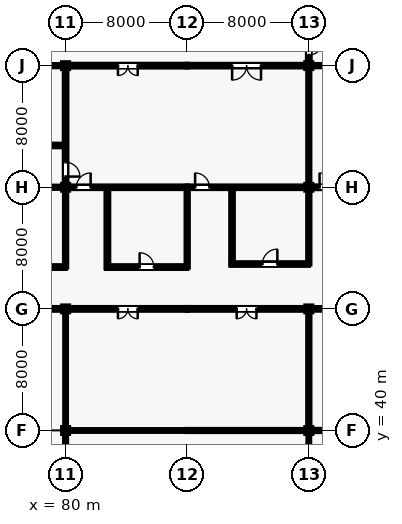
"""IFC4 building model, lengths in metres.
Left out: names, types, materials, properties, quantities, classifications, styles, units other than length and angle.
Written with IfcOpenShell. Run it as: python <this file> out.ifc"""

import sys

from ifc_helpers import new_model, si_unit, direction, frame, frame_2d, origin, origin_2d, place, context, subcontext, project, spatial, rectangle, i_section, extrude, element, fill, save


model = new_model("IFC4")
c1 = context("Model", 3, precision=1e-05, world=origin(), true_north=direction((0.0, 1.0)))
c2 = subcontext(c1, "Body", "Model", "MODEL_VIEW")
j1 = project(units=[si_unit("LENGTHUNIT", "METRE"), si_unit("PLANEANGLEUNIT", "RADIAN")], contexts=[c1])
p1 = place(None, origin())
s1 = spatial("IfcSite", under=j1, at=p1, CompositionType="ELEMENT")
p2 = place(p1, origin())
s2 = spatial("IfcBuilding", under=s1, at=p2, CompositionType="ELEMENT")
p3 = place(p2, origin())
s3 = spatial("IfcBuildingStorey", under=s2, at=p3, CompositionType="ELEMENT", Elevation=0.0)
for number, where, z_axis, x_axis in (
    (1, (80.0, 40.0, 0.0), (0.0, 0.0, 1.0), (1.0, 0.0, 0.0)),
    (2, (80.0, 48.0, 0.0), (0.0, 0.0, 1.0), (1.0, 0.0, 0.0)),
    (3, (80.0, 56.0, 0.0), (0.0, 0.0, 1.0), (1.0, 0.0, 0.0)),
    (4, (80.0, 64.0, 0.0), (0.0, 0.0, 1.0), (1.0, 0.0, 0.0)),
    (5, (96.0, 40.0, 0.0), (0.0, 0.0, 1.0), (1.0, 0.0, 0.0)),
    (6, (96.0, 48.0, 0.0), (0.0, 0.0, 1.0), (1.0, 0.0, 0.0)),
    (7, (96.0, 56.0, 0.0), (0.0, 0.0, 1.0), (1.0, 0.0, 0.0)),
    (8, (96.0, 64.0, 0.0), (0.0, 0.0, 1.0), (1.0, 0.0, 0.0)),
):
    element("IfcColumn", number, at=place(p3, frame(where, z_axis=z_axis, x_axis=x_axis)), inside=s3, PredefinedType="COLUMN", context=c2, shape_type="SweptSolid", body=[
        extrude(i_section(OverallWidth=0.398, OverallDepth=0.387, WebThickness=0.021, FlangeThickness=0.033, FilletRadius=0.015, at=origin_2d()), origin(), (0.0, 0.0, 1.0), 5.28),
    ])
p4 = place(p3, frame((74.7, 50.75, 0.0), z_axis=(0.0, 0.0, 1.0), x_axis=(1.0, 0.0, 0.0)))
e9 = element("IfcWall", 9, at=p4, inside=s3, PredefinedType="PARTITIONING", context=c2, shape_type="SweptSolid", body=[
    extrude(rectangle(XDim=5.28, YDim=0.185, at=frame_2d((2.64, 0.0))), origin(), (0.0, 0.0, 1.0), 4.403),
])
p5 = place(p4, frame((2.12, 0.0, 0.0)))
e10 = element("IfcOpeningElement", 10, at=p5, cuts=e9, PredefinedType="OPENING", context=c2, shape_type="SweptSolid", body=[
    extrude(rectangle(XDim=1.04, YDim=2.18, at=frame_2d((0.52, 1.09))), frame((0.0, 0.103, 0.0), z_axis=(0.0, -1.0, 0.0), x_axis=(1.0, 0.0, 0.0)), (0.0, 0.0, 1.0), 0.205),
])
p6 = place(p3, frame((74.75, 56.0, 0.0), z_axis=(0.0, 0.0, 1.0), x_axis=(1.0, 0.0, 0.0)))
e11 = element("IfcWall", 11, at=p6, inside=s3, PredefinedType="PARTITIONING", context=c2, shape_type="SweptSolid", body=[
    extrude(rectangle(XDim=5.041, YDim=0.15, at=frame_2d((2.521, 0.0))), origin(), (0.0, 0.0, 1.0), 4.327),
])
p7 = place(p3, frame((80.0, 50.75, 0.0), z_axis=(0.0, 0.0, 1.0), x_axis=(0.0, 1.0, 0.0)))
e12 = element("IfcWall", 12, at=p7, inside=s3, PredefinedType="PARTITIONING", context=c2, shape_type="SweptSolid", body=[
    extrude(rectangle(XDim=5.046, YDim=0.15, at=frame_2d((2.523, 0.0))), origin(), (0.0, 0.0, 1.0), 4.403),
])
p8 = place(p3, frame((74.7, 58.75, 0.0), z_axis=(0.0, 0.0, 1.0), x_axis=(1.0, 0.0, 0.0)))
e13 = element("IfcWall", 13, at=p8, inside=s3, PredefinedType="PARTITIONING", context=c2, shape_type="SweptSolid", body=[
    extrude(rectangle(XDim=5.28, YDim=0.175, at=frame_2d((2.64, 0.0))), origin(), (0.0, 0.0, 1.0), 4.412),
])
p9 = place(p8, frame((2.16, 0.0, 0.0)))
e14 = element("IfcOpeningElement", 14, at=p9, cuts=e13, PredefinedType="OPENING", context=c2, shape_type="SweptSolid", body=[
    extrude(rectangle(XDim=0.96, YDim=2.14, at=frame_2d((0.48, 1.07))), frame((0.0, 0.097, 0.0), z_axis=(0.0, -1.0, 0.0), x_axis=(1.0, 0.0, 0.0)), (0.0, 0.0, 1.0), 0.195),
])
p10 = place(p3, frame((74.75, 64.0, 0.0), z_axis=(0.0, 0.0, 1.0), x_axis=(1.0, 0.0, 0.0)))
e15 = element("IfcWall", 15, at=p10, inside=s3, PredefinedType="PARTITIONING", context=c2, shape_type="SweptSolid", body=[
    extrude(rectangle(XDim=5.041, YDim=0.15, at=frame_2d((2.521, 0.0))), origin(), (0.0, 0.0, 1.0), 4.403),
])
p11 = place(p3, frame((82.7, 50.75, 0.0), z_axis=(0.0, 0.0, 1.0), x_axis=(1.0, 0.0, 0.0)))
e16 = element("IfcWall", 16, at=p11, inside=s3, PredefinedType="PARTITIONING", context=c2, shape_type="SweptSolid", body=[
    extrude(rectangle(XDim=5.28, YDim=0.185, at=frame_2d((2.64, 0.0))), origin(), (0.0, 0.0, 1.0), 5.025),
])
p12 = place(p11, frame((2.17, 0.0, 0.0)))
e17 = element("IfcOpeningElement", 17, at=p12, cuts=e16, PredefinedType="OPENING", context=c2, shape_type="SweptSolid", body=[
    extrude(rectangle(XDim=0.94, YDim=2.12, at=frame_2d((0.47, 1.06))), frame((0.0, 0.103, 0.0), z_axis=(0.0, -1.0, 0.0), x_axis=(1.0, 0.0, 0.0)), (0.0, 0.0, 1.0), 0.205),
])
p13 = place(p3, frame((82.75, 50.7, 0.0), z_axis=(0.0, 0.0, 1.0), x_axis=(0.0, 1.0, 0.0)))
e18 = element("IfcWall", 18, at=p13, inside=s3, PredefinedType="PARTITIONING", context=c2, shape_type="SweptSolid", body=[
    extrude(rectangle(XDim=5.28, YDim=0.185, at=frame_2d((2.64, 0.0))), origin(), (0.0, 0.0, 1.0), 4.169),
])
p14 = place(p3, frame((88.0, 50.75, 0.0), z_axis=(0.0, 0.0, 1.0), x_axis=(0.0, 1.0, 0.0)))
e19 = element("IfcWall", 19, at=p14, inside=s3, PredefinedType="PARTITIONING", context=c2, shape_type="SweptSolid", body=[
    extrude(rectangle(XDim=5.23, YDim=0.15, at=frame_2d((2.615, 0.0))), origin(), (0.0, 0.0, 1.0), 4.169),
])
p15 = place(p3, frame((90.9, 50.95, 0.0), z_axis=(0.0, 0.0, 1.0), x_axis=(1.0, 0.0, 0.0)))
e20 = element("IfcWall", 20, at=p15, inside=s3, PredefinedType="PARTITIONING", context=c2, shape_type="SweptSolid", body=[
    extrude(rectangle(XDim=5.08, YDim=0.175, at=frame_2d((2.54, 0.0))), origin(), (0.0, 0.0, 1.0), 4.404),
])
p16 = place(p15, frame((2.05, 0.0, 0.0)))
e21 = element("IfcOpeningElement", 21, at=p16, cuts=e20, PredefinedType="OPENING", context=c2, shape_type="SweptSolid", body=[
    extrude(rectangle(XDim=0.98, YDim=2.15, at=frame_2d((0.49, 1.075))), frame((0.0, 0.097, 0.0), z_axis=(0.0, -1.0, 0.0), x_axis=(1.0, 0.0, 0.0)), (0.0, 0.0, 1.0), 0.195),
])
p17 = place(p3, frame((90.95, 50.9, 0.0), z_axis=(0.0, 0.0, 1.0), x_axis=(0.0, 1.0, 0.0)))
e22 = element("IfcWall", 22, at=p17, inside=s3, PredefinedType="PARTITIONING", context=c2, shape_type="SweptSolid", body=[
    extrude(rectangle(XDim=5.08, YDim=0.175, at=frame_2d((2.54, 0.0))), origin(), (0.0, 0.0, 1.0), 4.169),
])
p18 = place(p3, frame((96.0, 50.95, 0.0), z_axis=(0.0, 0.0, 1.0), x_axis=(0.0, 1.0, 0.0)))
e23 = element("IfcWall", 23, at=p18, inside=s3, PredefinedType="PARTITIONING", context=c2, shape_type="SweptSolid", body=[
    extrude(rectangle(XDim=4.846, YDim=0.15, at=frame_2d((2.423, 0.0))), origin(), (0.0, 0.0, 1.0), 4.404),
])
p19 = place(p3, frame((80.0, 32.184, 0.0), z_axis=(0.0, 0.0, 1.0), x_axis=(0.0, 1.0, 0.0)))
e24 = element("IfcWall", 24, at=p19, inside=s3, PredefinedType="PARTITIONING", context=c2, shape_type="SweptSolid", body=[
    extrude(rectangle(XDim=7.633, YDim=0.135, at=frame_2d((3.816, 0.0))), origin(), (0.0, 0.0, 1.0), 4.607),
])
p20 = place(p3, frame((80.0, 40.184, 0.0), z_axis=(0.0, 0.0, 1.0), x_axis=(0.0, 1.0, 0.0)))
e25 = element("IfcWall", 25, at=p20, inside=s3, PredefinedType="PARTITIONING", context=c2, shape_type="SweptSolid", body=[
    extrude(rectangle(XDim=7.633, YDim=0.12, at=frame_2d((3.816, 0.0))), origin(), (0.0, 0.0, 1.0), 4.471),
])
p21 = place(p3, frame((72.415, 48.0, 0.0), z_axis=(0.0, 0.0, 1.0), x_axis=(1.0, 0.0, 0.0)))
e26 = element("IfcWall", 26, at=p21, inside=s3, PredefinedType="PARTITIONING", context=c2, shape_type="SweptSolid", body=[
    extrude(rectangle(XDim=7.396, YDim=0.185, at=frame_2d((3.698, 0.0))), origin(), (0.0, 0.0, 1.0), 4.404),
])
p22 = place(p21, frame((3.048, 0.0, 0.0)))
e27 = element("IfcOpeningElement", 27, at=p22, cuts=e26, PredefinedType="OPENING", context=c2, shape_type="SweptSolid", body=[
    extrude(rectangle(XDim=1.3, YDim=2.2, at=frame_2d((0.65, 1.1))), frame((0.0, 0.103, 0.0), z_axis=(0.0, -1.0, 0.0), x_axis=(1.0, 0.0, 0.0)), (0.0, 0.0, 1.0), 0.205),
])
p23 = place(p3, frame((80.0, 56.184, 0.0), z_axis=(0.0, 0.0, 1.0), x_axis=(0.0, 1.0, 0.0)))
e28 = element("IfcWall", 28, at=p23, inside=s3, PredefinedType="PARTITIONING", context=c2, shape_type="SweptSolid", body=[
    extrude(rectangle(XDim=7.633, YDim=0.175, at=frame_2d((3.816, 0.0))), origin(), (0.0, 0.0, 1.0), 4.412),
])
p24 = place(p23, frame((0.52, 0.0, 0.0)))
e29 = element("IfcOpeningElement", 29, at=p24, cuts=e28, PredefinedType="OPENING", context=c2, shape_type="SweptSolid", body=[
    extrude(rectangle(XDim=0.94, YDim=2.12, at=frame_2d((0.47, 1.06))), frame((0.0, 0.097, 0.0), z_axis=(0.0, -1.0, 0.0), x_axis=(1.0, 0.0, 0.0)), (0.0, 0.0, 1.0), 0.195),
])
p25 = place(p3, frame((80.189, 40.0, 0.0), z_axis=(0.0, 0.0, 1.0), x_axis=(1.0, 0.0, 0.0)))
e30 = element("IfcWall", 30, at=p25, inside=s3, PredefinedType="PARTITIONING", context=c2, shape_type="SweptSolid", body=[
    extrude(rectangle(XDim=7.811, YDim=0.12, at=frame_2d((3.906, 0.0))), origin(), (0.0, 0.0, 1.0), 4.262),
])
p26 = place(p3, frame((80.189, 48.0, 0.0), z_axis=(0.0, 0.0, 1.0), x_axis=(1.0, 0.0, 0.0)))
e31 = element("IfcWall", 31, at=p26, inside=s3, PredefinedType="PARTITIONING", context=c2, shape_type="SweptSolid", body=[
    extrude(rectangle(XDim=7.811, YDim=0.185, at=frame_2d((3.906, 0.0))), origin(), (0.0, 0.0, 1.0), 4.097),
])
p27 = place(p26, frame((3.256, 0.0, 0.0)))
e32 = element("IfcOpeningElement", 32, at=p27, cuts=e31, PredefinedType="OPENING", context=c2, shape_type="SweptSolid", body=[
    extrude(rectangle(XDim=1.3, YDim=2.2, at=frame_2d((0.65, 1.1))), frame((0.0, 0.103, 0.0), z_axis=(0.0, -1.0, 0.0), x_axis=(1.0, 0.0, 0.0)), (0.0, 0.0, 1.0), 0.205),
])
p28 = place(p3, frame((80.189, 56.0, 0.0), z_axis=(0.0, 0.0, 1.0), x_axis=(1.0, 0.0, 0.0)))
e33 = element("IfcWall", 33, at=p28, inside=s3, PredefinedType="PARTITIONING", context=c2, shape_type="SweptSolid", body=[
    extrude(rectangle(XDim=7.811, YDim=0.175, at=frame_2d((3.906, 0.0))), origin(), (0.0, 0.0, 1.0), 4.169),
])
p29 = place(p28, frame((0.52, 0.0, 0.0)))
e34 = element("IfcOpeningElement", 34, at=p29, cuts=e33, PredefinedType="OPENING", context=c2, shape_type="SweptSolid", body=[
    extrude(rectangle(XDim=0.94, YDim=2.12, at=frame_2d((0.47, 1.06))), frame((0.0, 0.097, 0.0), z_axis=(0.0, -1.0, 0.0), x_axis=(1.0, 0.0, 0.0)), (0.0, 0.0, 1.0), 0.195),
])
p30 = place(p3, frame((80.189, 64.0, 0.0), z_axis=(0.0, 0.0, 1.0), x_axis=(1.0, 0.0, 0.0)))
e35 = element("IfcWall", 35, at=p30, inside=s3, PredefinedType="PARTITIONING", context=c2, shape_type="SweptSolid", body=[
    extrude(rectangle(XDim=7.811, YDim=0.185, at=frame_2d((3.906, 0.0))), origin(), (0.0, 0.0, 1.0), 4.25),
])
p31 = place(p30, frame((3.256, 0.0, 0.0)))
e36 = element("IfcOpeningElement", 36, at=p31, cuts=e35, PredefinedType="OPENING", context=c2, shape_type="SweptSolid", body=[
    extrude(rectangle(XDim=1.3, YDim=2.2, at=frame_2d((0.65, 1.1))), frame((0.0, 0.103, 0.0), z_axis=(0.0, -1.0, 0.0), x_axis=(1.0, 0.0, 0.0)), (0.0, 0.0, 1.0), 0.205),
])
p32 = place(p3, frame((96.0, 32.184, 0.0), z_axis=(0.0, 0.0, 1.0), x_axis=(0.0, 1.0, 0.0)))
e37 = element("IfcWall", 37, at=p32, inside=s3, PredefinedType="PARTITIONING", context=c2, shape_type="SweptSolid", body=[
    extrude(rectangle(XDim=7.633, YDim=0.12, at=frame_2d((3.816, 0.0))), origin(), (0.0, 0.0, 1.0), 4.603),
])
p33 = place(p3, frame((88.0, 40.0, 0.0), z_axis=(0.0, 0.0, 1.0), x_axis=(1.0, 0.0, 0.0)))
e38 = element("IfcWall", 38, at=p33, inside=s3, PredefinedType="PARTITIONING", context=c2, shape_type="SweptSolid", body=[
    extrude(rectangle(XDim=7.811, YDim=0.142, at=frame_2d((3.906, 0.0))), origin(), (0.0, 0.0, 1.0), 4.262),
])
p34 = place(p3, frame((96.0, 40.184, 0.0), z_axis=(0.0, 0.0, 1.0), x_axis=(0.0, 1.0, 0.0)))
e39 = element("IfcWall", 39, at=p34, inside=s3, PredefinedType="PARTITIONING", context=c2, shape_type="SweptSolid", body=[
    extrude(rectangle(XDim=7.633, YDim=0.15, at=frame_2d((3.816, 0.0))), origin(), (0.0, 0.0, 1.0), 4.412),
])
p35 = place(p3, frame((88.0, 48.0, 0.0), z_axis=(0.0, 0.0, 1.0), x_axis=(1.0, 0.0, 0.0)))
e40 = element("IfcWall", 40, at=p35, inside=s3, PredefinedType="PARTITIONING", context=c2, shape_type="SweptSolid", body=[
    extrude(rectangle(XDim=7.811, YDim=0.185, at=frame_2d((3.906, 0.0))), origin(), (0.0, 0.0, 1.0), 4.097),
])
p36 = place(p35, frame((3.256, 0.0, 0.0)))
e41 = element("IfcOpeningElement", 41, at=p36, cuts=e40, PredefinedType="OPENING", context=c2, shape_type="SweptSolid", body=[
    extrude(rectangle(XDim=1.3, YDim=2.2, at=frame_2d((0.65, 1.1))), frame((0.0, 0.103, 0.0), z_axis=(0.0, -1.0, 0.0), x_axis=(1.0, 0.0, 0.0)), (0.0, 0.0, 1.0), 0.205),
])
p37 = place(p3, frame((88.0, 56.0, 0.0), z_axis=(0.0, 0.0, 1.0), x_axis=(1.0, 0.0, 0.0)))
e42 = element("IfcWall", 42, at=p37, inside=s3, PredefinedType="PARTITIONING", context=c2, shape_type="SweptSolid", body=[
    extrude(rectangle(XDim=7.811, YDim=0.175, at=frame_2d((3.906, 0.0))), origin(), (0.0, 0.0, 1.0), 4.169),
])
p38 = place(p37, frame((0.52, 0.0, 0.0)))
e43 = element("IfcOpeningElement", 43, at=p38, cuts=e42, PredefinedType="OPENING", context=c2, shape_type="SweptSolid", body=[
    extrude(rectangle(XDim=0.94, YDim=2.12, at=frame_2d((0.47, 1.06))), frame((0.0, 0.097, 0.0), z_axis=(0.0, -1.0, 0.0), x_axis=(1.0, 0.0, 0.0)), (0.0, 0.0, 1.0), 0.195),
])
p39 = place(p3, frame((96.0, 56.184, 0.0), z_axis=(0.0, 0.0, 1.0), x_axis=(0.0, 1.0, 0.0)))
e44 = element("IfcWall", 44, at=p39, inside=s3, PredefinedType="PARTITIONING", context=c2, shape_type="SweptSolid", body=[
    extrude(rectangle(XDim=7.633, YDim=0.142, at=frame_2d((3.816, 0.0))), origin(), (0.0, 0.0, 1.0), 4.471),
])
p40 = place(p3, frame((88.0, 64.0, 0.0), z_axis=(0.0, 0.0, 1.0), x_axis=(1.0, 0.0, 0.0)))
e45 = element("IfcWall", 45, at=p40, inside=s3, PredefinedType="PARTITIONING", context=c2, shape_type="SweptSolid", body=[
    extrude(rectangle(XDim=7.811, YDim=0.175, at=frame_2d((3.906, 0.0))), origin(), (0.0, 0.0, 1.0), 4.25),
])
p41 = place(p40, frame((2.956, 0.0, 0.0)))
e46 = element("IfcOpeningElement", 46, at=p41, cuts=e45, PredefinedType="OPENING", context=c2, shape_type="SweptSolid", body=[
    extrude(rectangle(XDim=1.9, YDim=2.38, at=frame_2d((0.95, 1.19))), frame((0.0, 0.097, 0.0), z_axis=(0.0, -1.0, 0.0), x_axis=(1.0, 0.0, 0.0)), (0.0, 0.0, 1.0), 0.195),
])
p42 = place(p3, frame((96.0, 64.184, 0.0), z_axis=(0.0, 0.0, 1.0), x_axis=(0.0, 1.0, 0.0)))
e47 = element("IfcWall", 47, at=p42, inside=s3, PredefinedType="PARTITIONING", context=c2, shape_type="SweptSolid", body=[
    extrude(rectangle(XDim=7.633, YDim=0.185, at=frame_2d((3.816, 0.0))), origin(), (0.0, 0.0, 1.0), 4.403),
])
p43 = place(p42, frame((0.52, 0.0, 0.0)))
e48 = element("IfcOpeningElement", 48, at=p43, cuts=e47, PredefinedType="OPENING", context=c2, shape_type="SweptSolid", body=[
    extrude(rectangle(XDim=0.94, YDim=2.12, at=frame_2d((0.47, 1.06))), frame((0.0, 0.103, 0.0), z_axis=(0.0, -1.0, 0.0), x_axis=(1.0, 0.0, 0.0)), (0.0, 0.0, 1.0), 0.205),
])
p44 = place(p3, frame((96.189, 40.0, 0.0), z_axis=(0.0, 0.0, 1.0), x_axis=(1.0, 0.0, 0.0)))
e49 = element("IfcWall", 49, at=p44, inside=s3, PredefinedType="PARTITIONING", context=c2, shape_type="SweptSolid", body=[
    extrude(rectangle(XDim=7.396, YDim=0.15, at=frame_2d((3.698, 0.0))), origin(), (0.0, 0.0, 1.0), 4.403),
])
p45 = place(p3, frame((96.189, 48.0, 0.0), z_axis=(0.0, 0.0, 1.0), x_axis=(1.0, 0.0, 0.0)))
e50 = element("IfcWall", 50, at=p45, inside=s3, PredefinedType="PARTITIONING", context=c2, shape_type="SweptSolid", body=[
    extrude(rectangle(XDim=7.396, YDim=0.175, at=frame_2d((3.698, 0.0))), origin(), (0.0, 0.0, 1.0), 4.336),
])
p46 = place(p45, frame((1.359, 0.0, 0.0)))
e51 = element("IfcOpeningElement", 51, at=p46, cuts=e50, PredefinedType="OPENING", context=c2, shape_type="SweptSolid", body=[
    extrude(rectangle(XDim=0.98, YDim=2.15, at=frame_2d((0.49, 1.075))), frame((0.0, 0.097, 0.0), z_axis=(0.0, -1.0, 0.0), x_axis=(1.0, 0.0, 0.0)), (0.0, 0.0, 1.0), 0.195),
])
p47 = place(p45, frame((5.427, 0.0, 0.0)))
e52 = element("IfcOpeningElement", 52, at=p47, cuts=e50, PredefinedType="OPENING", context=c2, shape_type="SweptSolid", body=[
    extrude(rectangle(XDim=0.98, YDim=2.15, at=frame_2d((0.49, 1.075))), frame((0.0, 0.097, 0.0), z_axis=(0.0, -1.0, 0.0), x_axis=(1.0, 0.0, 0.0)), (0.0, 0.0, 1.0), 0.195),
])
p48 = place(p3, frame((96.189, 56.0, 0.0), z_axis=(0.0, 0.0, 1.0), x_axis=(1.0, 0.0, 0.0)))
e53 = element("IfcWall", 53, at=p48, inside=s3, PredefinedType="PARTITIONING", context=c2, shape_type="SweptSolid", body=[
    extrude(rectangle(XDim=7.396, YDim=0.185, at=frame_2d((3.698, 0.0))), origin(), (0.0, 0.0, 1.0), 4.404),
])
p49 = place(p48, frame((0.52, 0.0, 0.0)))
e54 = element("IfcOpeningElement", 54, at=p49, cuts=e53, PredefinedType="OPENING", context=c2, shape_type="SweptSolid", body=[
    extrude(rectangle(XDim=0.94, YDim=2.12, at=frame_2d((0.47, 1.06))), frame((0.0, 0.103, 0.0), z_axis=(0.0, -1.0, 0.0), x_axis=(1.0, 0.0, 0.0)), (0.0, 0.0, 1.0), 0.205),
])
p50 = place(p3, frame((96.189, 64.0, 0.0), z_axis=(0.0, 0.0, 1.0), x_axis=(1.0, 0.0, 0.0)))
e55 = element("IfcWall", 55, at=p50, inside=s3, PredefinedType="PARTITIONING", context=c2, shape_type="SweptSolid", body=[
    extrude(rectangle(XDim=7.396, YDim=0.15, at=frame_2d((3.698, 0.0))), origin(), (0.0, 0.0, 1.0), 4.327),
])
p51 = place(p12, origin())
e56 = element("IfcDoor", 56, at=p51, inside=s3, OperationType="SINGLE_SWING_LEFT", PredefinedType="DOOR", context=c2, shape_type="SweptSolid", body=[
    extrude(rectangle(XDim=0.94, YDim=2.12, at=frame_2d((0.47, 1.06))), frame((0.0, 0.025, 0.0), z_axis=(0.0, -1.0, 0.0), x_axis=(1.0, 0.0, 0.0)), (0.0, 0.0, 1.0), 0.05),
])
fill(e17, e56)
p52 = place(p16, origin())
e57 = element("IfcDoor", 57, at=p52, inside=s3, OperationType="SINGLE_SWING_RIGHT", PredefinedType="DOOR", context=c2, shape_type="SweptSolid", body=[
    extrude(rectangle(XDim=0.98, YDim=2.15, at=frame_2d((0.49, 1.075))), frame((0.0, 0.025, 0.0), z_axis=(0.0, -1.0, 0.0), x_axis=(1.0, 0.0, 0.0)), (0.0, 0.0, 1.0), 0.05),
])
fill(e21, e57)
p53 = place(p24, frame((0.94, 0.0, 0.0), z_axis=(0.0, 0.0, 1.0), x_axis=(-1.0, 0.0, 0.0)))
e58 = element("IfcDoor", 58, at=p53, inside=s3, OperationType="SINGLE_SWING_LEFT", PredefinedType="DOOR", context=c2, shape_type="SweptSolid", body=[
    extrude(rectangle(XDim=0.94, YDim=2.12, at=frame_2d((0.47, 1.06))), frame((0.0, 0.025, 0.0), z_axis=(0.0, -1.0, 0.0), x_axis=(1.0, 0.0, 0.0)), (0.0, 0.0, 1.0), 0.05),
])
fill(e29, e58)
p54 = place(p27, frame((1.3, 0.0, 0.0), z_axis=(0.0, 0.0, 1.0), x_axis=(-1.0, 0.0, 0.0)))
e59 = element("IfcDoor", 59, at=p54, inside=s3, OperationType="DOUBLE_DOOR_SINGLE_SWING", PredefinedType="DOOR", context=c2, shape_type="SweptSolid", body=[
    extrude(rectangle(XDim=1.3, YDim=2.2, at=frame_2d((0.65, 1.1))), frame((0.0, 0.025, 0.0), z_axis=(0.0, -1.0, 0.0), x_axis=(1.0, 0.0, 0.0)), (0.0, 0.0, 1.0), 0.05),
])
fill(e32, e59)
p55 = place(p29, origin())
e60 = element("IfcDoor", 60, at=p55, inside=s3, OperationType="SINGLE_SWING_RIGHT", PredefinedType="DOOR", context=c2, shape_type="SweptSolid", body=[
    extrude(rectangle(XDim=0.94, YDim=2.12, at=frame_2d((0.47, 1.06))), frame((0.0, 0.025, 0.0), z_axis=(0.0, -1.0, 0.0), x_axis=(1.0, 0.0, 0.0)), (0.0, 0.0, 1.0), 0.05),
])
fill(e34, e60)
p56 = place(p31, frame((1.3, 0.0, 0.0), z_axis=(0.0, 0.0, 1.0), x_axis=(-1.0, 0.0, 0.0)))
e61 = element("IfcDoor", 61, at=p56, inside=s3, OperationType="DOUBLE_DOOR_SINGLE_SWING", PredefinedType="DOOR", context=c2, shape_type="SweptSolid", body=[
    extrude(rectangle(XDim=1.3, YDim=2.2, at=frame_2d((0.65, 1.1))), frame((0.0, 0.025, 0.0), z_axis=(0.0, -1.0, 0.0), x_axis=(1.0, 0.0, 0.0)), (0.0, 0.0, 1.0), 0.05),
])
fill(e36, e61)
p57 = place(p36, frame((1.3, 0.0, 0.0), z_axis=(0.0, 0.0, 1.0), x_axis=(-1.0, 0.0, 0.0)))
e62 = element("IfcDoor", 62, at=p57, inside=s3, OperationType="DOUBLE_DOOR_SINGLE_SWING", PredefinedType="DOOR", context=c2, shape_type="SweptSolid", body=[
    extrude(rectangle(XDim=1.3, YDim=2.2, at=frame_2d((0.65, 1.1))), frame((0.0, 0.025, 0.0), z_axis=(0.0, -1.0, 0.0), x_axis=(1.0, 0.0, 0.0)), (0.0, 0.0, 1.0), 0.05),
])
fill(e41, e62)
p58 = place(p38, origin())
e63 = element("IfcDoor", 63, at=p58, inside=s3, OperationType="SINGLE_SWING_LEFT", PredefinedType="DOOR", context=c2, shape_type="SweptSolid", body=[
    extrude(rectangle(XDim=0.94, YDim=2.12, at=frame_2d((0.47, 1.06))), frame((0.0, 0.025, 0.0), z_axis=(0.0, -1.0, 0.0), x_axis=(1.0, 0.0, 0.0)), (0.0, 0.0, 1.0), 0.05),
])
fill(e43, e63)
p59 = place(p41, frame((1.9, 0.0, 0.0), z_axis=(0.0, 0.0, 1.0), x_axis=(-1.0, 0.0, 0.0)))
e64 = element("IfcDoor", 64, at=p59, inside=s3, OperationType="DOUBLE_DOOR_SINGLE_SWING", PredefinedType="DOOR", context=c2, shape_type="SweptSolid", body=[
    extrude(rectangle(XDim=1.9, YDim=2.38, at=frame_2d((0.95, 1.19))), frame((0.0, 0.025, 0.0), z_axis=(0.0, -1.0, 0.0), x_axis=(1.0, 0.0, 0.0)), (0.0, 0.0, 1.0), 0.05),
])
fill(e46, e64)
p60 = place(p43, frame((0.94, 0.0, 0.0), z_axis=(0.0, 0.0, 1.0), x_axis=(-1.0, 0.0, 0.0)))
e65 = element("IfcDoor", 65, at=p60, inside=s3, OperationType="SINGLE_SWING_RIGHT", PredefinedType="DOOR", context=c2, shape_type="SweptSolid", body=[
    extrude(rectangle(XDim=0.94, YDim=2.12, at=frame_2d((0.47, 1.06))), frame((0.0, 0.025, 0.0), z_axis=(0.0, -1.0, 0.0), x_axis=(1.0, 0.0, 0.0)), (0.0, 0.0, 1.0), 0.05),
])
fill(e48, e65)
p61 = place(p49, origin())
e66 = element("IfcDoor", 66, at=p61, inside=s3, OperationType="SINGLE_SWING_LEFT", PredefinedType="DOOR", context=c2, shape_type="SweptSolid", body=[
    extrude(rectangle(XDim=0.94, YDim=2.12, at=frame_2d((0.47, 1.06))), frame((0.0, 0.025, 0.0), z_axis=(0.0, -1.0, 0.0), x_axis=(1.0, 0.0, 0.0)), (0.0, 0.0, 1.0), 0.05),
])
fill(e54, e66)
save(model, sys.argv[1])
